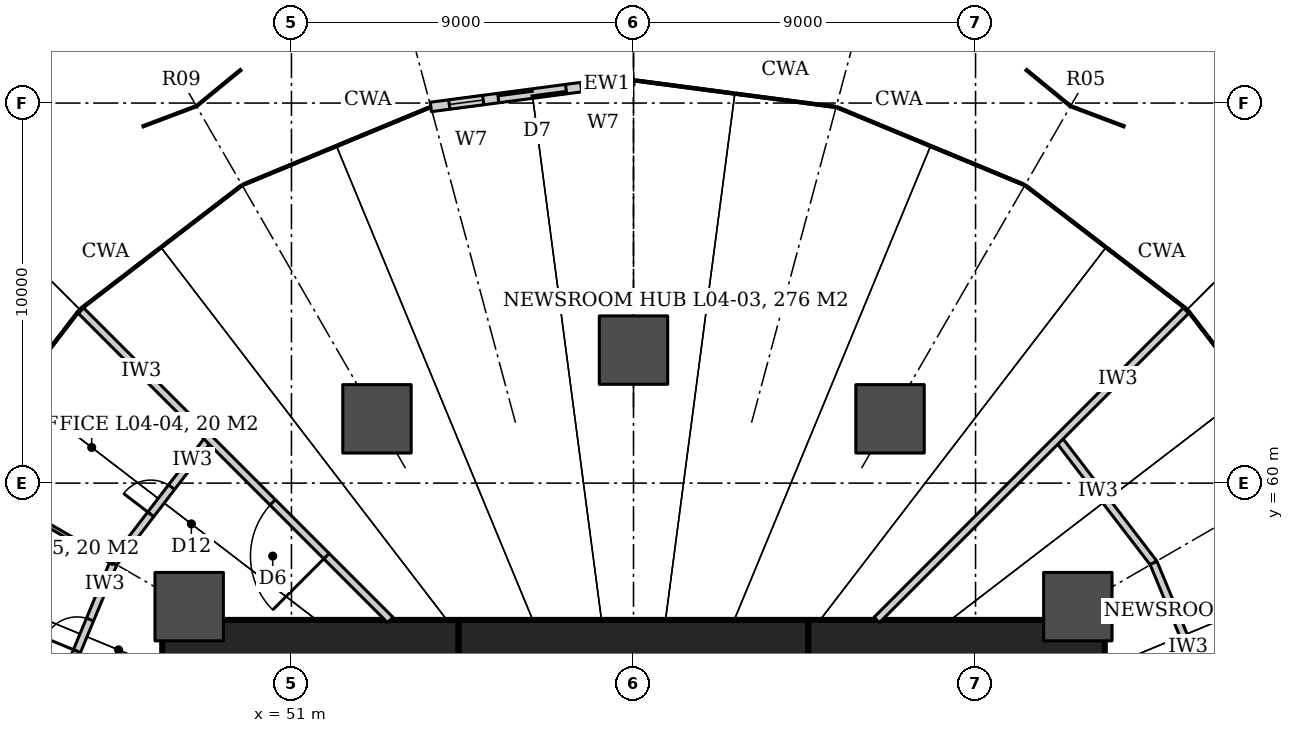
"""IFC4 building model, lengths in metres.
Left out: names, types, materials, properties, quantities, classifications, styles, units other than length and angle.
Written with IfcOpenShell. Run it as: python <this file> out.ifc"""

import sys

from ifc_helpers import new_model, si_unit, direction, frame, frame_2d, origin, origin_2d, place, context, subcontext, project, spatial, rectangle, hollow_circle, extrude, element, fill, save


model = new_model("IFC4")
c1 = context("Model", 3, precision=1e-05, world=origin(), true_north=direction((0.0, 1.0)))
c2 = subcontext(c1, "Body", "Model", "MODEL_VIEW")
j1 = project(units=[si_unit("LENGTHUNIT", "METRE"), si_unit("PLANEANGLEUNIT", "RADIAN")], contexts=[c1])
p1 = place(None, origin())
s1 = spatial("IfcSite", under=j1, at=p1, CompositionType="ELEMENT")
p2 = place(p1, origin())
s2 = spatial("IfcBuilding", under=s1, at=p2, CompositionType="ELEMENT")
p3 = place(p2, frame((0.0, 0.0, 26.0)))
s3 = spatial("IfcBuildingStorey", under=s2, at=p3, CompositionType="ELEMENT", Elevation=26.0)
p4 = place(p3, frame((47.6, 55.5, 0.0), z_axis=(0.0, 0.0, 1.0), x_axis=(1.0, 0.0, 0.0)))
e1 = element("IfcWall", 1, at=p4, inside=s3, PredefinedType="SHEAR", context=c2, shape_type="SweptSolid", body=[
    extrude(rectangle(XDim=7.8, YDim=1.8, at=frame_2d((3.9, 0.0))), origin(), (0.0, 0.0, 1.0), 4.2),
])
p5 = place(p3, frame((55.4, 55.5, 0.0), z_axis=(0.0, 0.0, 1.0), x_axis=(1.0, 0.0, 0.0)))
e2 = element("IfcWall", 2, at=p5, inside=s3, PredefinedType="SHEAR", context=c2, shape_type="SweptSolid", body=[
    extrude(rectangle(XDim=9.2, YDim=1.8, at=frame_2d((4.6, 0.0))), origin(), (0.0, 0.0, 1.0), 4.2),
])
p6 = place(p3, frame((64.6, 55.5, 0.0), z_axis=(0.0, 0.0, 1.0), x_axis=(1.0, 0.0, 0.0)))
e3 = element("IfcWall", 3, at=p6, inside=s3, PredefinedType="SHEAR", context=c2, shape_type="SweptSolid", body=[
    extrude(rectangle(XDim=7.8, YDim=1.8, at=frame_2d((3.9, 0.0))), origin(), (0.0, 0.0, 1.0), 4.2),
])
for number, where, z_axis, x_axis in (
    (4, (71.691, 56.75, -0.16), (0.0, 0.0, 1.0), (1.0, 0.0, 0.0)),
    (5, (66.75, 61.691, -0.16), (0.0, 0.0, 1.0), (1.0, 0.0, 0.0)),
    (6, (60.0, 63.5, -0.16), (0.0, 0.0, 1.0), (1.0, 0.0, 0.0)),
    (7, (53.25, 61.691, -0.16), (0.0, 0.0, 1.0), (1.0, 0.0, 0.0)),
    (8, (48.309, 56.75, -0.16), (0.0, 0.0, 1.0), (1.0, 0.0, 0.0)),
):
    element("IfcColumn", number, at=place(p3, frame(where, z_axis=z_axis, x_axis=x_axis)), inside=s3, PredefinedType="COLUMN", context=c2, shape_type="SweptSolid", body=[
        extrude(hollow_circle(Radius=0.9, WallThickness=0.09, at=origin_2d()), origin(), (0.0, 0.0, 1.0), 4.36),
    ])
p7 = place(p3, frame((44.738, 54.089, 0.0), z_axis=(0.0, 0.0, 1.0), x_axis=(0.382731667114, 0.923859551549, 0.0)))
e9 = element("IfcWall", 9, at=p7, inside=s3, PredefinedType="PARTITIONING", context=c2, shape_type="SweptSolid", body=[
    extrude(rectangle(XDim=4.125, YDim=0.2, at=frame_2d((2.062, 0.0))), origin(), (0.0, 0.0, 1.0), 3.04),
])
p8 = place(p7, frame((1.612, 0.0, 0.0)))
e10 = element("IfcOpeningElement", 10, at=p8, cuts=e9, PredefinedType="OPENING", context=c2, shape_type="SweptSolid", body=[
    extrude(rectangle(XDim=0.9, YDim=2.4, at=frame_2d((0.45, 1.2))), frame((0.0, 0.11, 0.0), z_axis=(0.0, -1.0, 0.0), x_axis=(1.0, 0.0, 0.0)), (0.0, 0.0, 1.0), 0.22),
])
p9 = place(p3, frame((46.317, 57.9, 0.0), z_axis=(0.0, 0.0, 1.0), x_axis=(0.608714823874, 0.793389099494, 0.0)))
e11 = element("IfcWall", 11, at=p9, inside=s3, PredefinedType="PARTITIONING", context=c2, shape_type="SweptSolid", body=[
    extrude(rectangle(XDim=4.125, YDim=0.2, at=frame_2d((2.062, 0.0))), origin(), (0.0, 0.0, 1.0), 3.04),
])
p10 = place(p9, frame((1.612, 0.0, 0.0)))
e12 = element("IfcOpeningElement", 12, at=p10, cuts=e11, PredefinedType="OPENING", context=c2, shape_type="SweptSolid", body=[
    extrude(rectangle(XDim=0.9, YDim=2.4, at=frame_2d((0.45, 1.2))), frame((0.0, 0.11, 0.0), z_axis=(0.0, -1.0, 0.0), x_axis=(1.0, 0.0, 0.0)), (0.0, 0.0, 1.0), 0.22),
])
p11 = place(p3, frame((71.172, 61.172, 0.0), z_axis=(0.0, 0.0, 1.0), x_axis=(0.608714823874, -0.793389099494, 0.0)))
e13 = element("IfcWall", 13, at=p11, inside=s3, PredefinedType="PARTITIONING", context=c2, shape_type="SweptSolid", body=[
    extrude(rectangle(XDim=4.125, YDim=0.2, at=frame_2d((2.062, 0.0))), origin(), (0.0, 0.0, 1.0), 3.04),
])
p12 = place(p3, frame((73.683, 57.9, 0.0), z_axis=(0.0, 0.0, 1.0), x_axis=(0.382731667114, -0.923859551549, 0.0)))
e14 = element("IfcWall", 14, at=p12, inside=s3, PredefinedType="PARTITIONING", context=c2, shape_type="SweptSolid", body=[
    extrude(rectangle(XDim=4.125, YDim=0.2, at=frame_2d((2.062, 0.0))), origin(), (0.0, 0.0, 1.0), 3.04),
])
p13 = place(p3, frame((66.4, 56.4, 0.0), z_axis=(0.0, 0.0, 1.0), x_axis=(0.707106781187, 0.707106781187, 0.0)))
e15 = element("IfcWall", 15, at=p13, inside=s3, PredefinedType="PARTITIONING", context=c2, shape_type="SweptSolid", body=[
    extrude(rectangle(XDim=11.509, YDim=0.2, at=frame_2d((5.754, 0.0))), origin(), (0.0, 0.0, 1.0), 3.02),
])
p14 = place(p3, frame((53.6, 56.4, 0.0), z_axis=(0.0, 0.0, 1.0), x_axis=(-0.707106781187, 0.707106781187, 0.0)))
e16 = element("IfcWall", 16, at=p14, inside=s3, PredefinedType="PARTITIONING", context=c2, shape_type="SweptSolid", body=[
    extrude(rectangle(XDim=11.509, YDim=0.2, at=frame_2d((5.754, 0.0))), origin(), (0.0, 0.0, 1.0), 3.02),
])
p15 = place(p14, frame((2.375, 0.0, 0.0)))
e17 = element("IfcOpeningElement", 17, at=p15, cuts=e16, PredefinedType="OPENING", context=c2, shape_type="SweptSolid", body=[
    extrude(rectangle(XDim=2.0, YDim=2.1, at=frame_2d((1.0, 1.05))), frame((0.0, 0.11, 0.0), z_axis=(0.0, -1.0, 0.0), x_axis=(1.0, 0.0, 0.0)), (0.0, 0.0, 1.0), 0.22),
])
p16 = place(p3, frame((46.317, 57.9, 0.0), z_axis=(0.0, 0.0, 1.0), x_axis=(-0.866015616091, 0.5000169524, 0.0)))
e18 = element("IfcWall", 18, at=p16, inside=s3, PredefinedType="PARTITIONING", context=c2, shape_type="SweptSolid", body=[
    extrude(rectangle(XDim=4.76, YDim=0.1, at=frame_2d((2.38, 0.0))), origin(), (0.0, 0.0, 1.0), 3.04),
])
p17 = place(p3, frame((60.0, 70.6, 0.0), z_axis=(0.0, 0.0, 1.0), x_axis=(-0.991445794844, -0.130519101615, 0.0)))
e19 = element("IfcWall", 19, at=p17, inside=s3, PredefinedType="SOLIDWALL", context=c2, shape_type="SweptSolid", body=[
    extrude(rectangle(XDim=5.378, YDim=0.25, at=frame_2d((2.689, 0.0))), origin(), (0.0, 0.0, 1.0), 4.04),
])
p18 = place(p17, frame((1.789, 0.0, 0.0)))
e20 = element("IfcOpeningElement", 20, at=p18, cuts=e19, PredefinedType="OPENING", context=c2, shape_type="SweptSolid", body=[
    extrude(rectangle(XDim=1.8, YDim=2.4, at=frame_2d((0.9, 1.2))), frame((0.0, 0.135, 0.0), z_axis=(0.0, -1.0, 0.0), x_axis=(1.0, 0.0, 0.0)), (0.0, 0.0, 1.0), 0.27),
])
p19 = place(p17, frame((0.489, 0.0, 0.0)))
e21 = element("IfcOpeningElement", 21, at=p19, cuts=e19, PredefinedType="OPENING", context=c2, shape_type="SweptSolid", body=[
    extrude(rectangle(XDim=0.9, YDim=2.4, at=frame_2d((0.45, 1.2))), frame((0.0, 0.135, 0.0), z_axis=(0.0, -1.0, 0.0), x_axis=(1.0, 0.0, 0.0)), (0.0, 0.0, 1.0), 0.27),
])
p20 = place(p17, frame((3.989, 0.0, 0.0)))
e22 = element("IfcOpeningElement", 22, at=p20, cuts=e19, PredefinedType="OPENING", context=c2, shape_type="SweptSolid", body=[
    extrude(rectangle(XDim=0.9, YDim=2.4, at=frame_2d((0.45, 1.2))), frame((0.0, 0.135, 0.0), z_axis=(0.0, -1.0, 0.0), x_axis=(1.0, 0.0, 0.0)), (0.0, 0.0, 1.0), 0.27),
])
p21 = place(p15, origin())
e23 = element("IfcDoor", 23, at=p21, inside=s3, OperationType="DOUBLE_DOOR_DOUBLE_SWING", PredefinedType="DOOR", context=c2, shape_type="SweptSolid", body=[
    extrude(rectangle(XDim=2.0, YDim=2.1, at=frame_2d((1.0, 1.05))), frame((0.0, 0.025, 0.0), z_axis=(0.0, -1.0, 0.0), x_axis=(1.0, 0.0, 0.0)), (0.0, 0.0, 1.0), 0.05),
])
fill(e17, e23)
p22 = place(p10, origin())
e24 = element("IfcDoor", 24, at=p22, inside=s3, OperationType="SINGLE_SWING_LEFT", PredefinedType="DOOR", context=c2, shape_type="SweptSolid", body=[
    extrude(rectangle(XDim=0.9, YDim=2.4, at=frame_2d((0.45, 1.2))), frame((0.0, 0.025, 0.0), z_axis=(0.0, -1.0, 0.0), x_axis=(1.0, 0.0, 0.0)), (0.0, 0.0, 1.0), 0.05),
])
fill(e12, e24)
p23 = place(p8, origin())
e25 = element("IfcDoor", 25, at=p23, inside=s3, OperationType="SINGLE_SWING_LEFT", PredefinedType="DOOR", context=c2, shape_type="SweptSolid", body=[
    extrude(rectangle(XDim=0.9, YDim=2.4, at=frame_2d((0.45, 1.2))), frame((0.0, 0.025, 0.0), z_axis=(0.0, -1.0, 0.0), x_axis=(1.0, 0.0, 0.0)), (0.0, 0.0, 1.0), 0.05),
])
fill(e10, e25)
p24 = place(p18, origin())
e26 = element("IfcDoor", 26, at=p24, inside=s3, OperationType="DOUBLE_DOOR_SLIDING", PredefinedType="DOOR", context=c2, shape_type="SweptSolid", body=[
    extrude(rectangle(XDim=1.8, YDim=2.4, at=frame_2d((0.9, 1.2))), frame((0.0, 0.025, 0.0), z_axis=(0.0, -1.0, 0.0), x_axis=(1.0, 0.0, 0.0)), (0.0, 0.0, 1.0), 0.05),
])
fill(e20, e26)
p25 = place(p19, origin())
e27 = element("IfcWindow", 27, at=p25, inside=s3, PartitioningType="SINGLE_PANEL", PredefinedType="WINDOW", context=c2, shape_type="SweptSolid", body=[
    extrude(rectangle(XDim=0.9, YDim=2.4, at=frame_2d((0.45, 1.2))), frame((0.0, 0.03, 0.0), z_axis=(0.0, -1.0, 0.0), x_axis=(1.0, 0.0, 0.0)), (0.0, 0.0, 1.0), 0.06),
])
fill(e21, e27)
p26 = place(p20, origin())
e28 = element("IfcWindow", 28, at=p26, inside=s3, PartitioningType="SINGLE_PANEL", PredefinedType="WINDOW", context=c2, shape_type="SweptSolid", body=[
    extrude(rectangle(XDim=0.9, YDim=2.4, at=frame_2d((0.45, 1.2))), frame((0.0, 0.03, 0.0), z_axis=(0.0, -1.0, 0.0), x_axis=(1.0, 0.0, 0.0)), (0.0, 0.0, 1.0), 0.06),
])
fill(e22, e28)
save(model, sys.argv[1])
